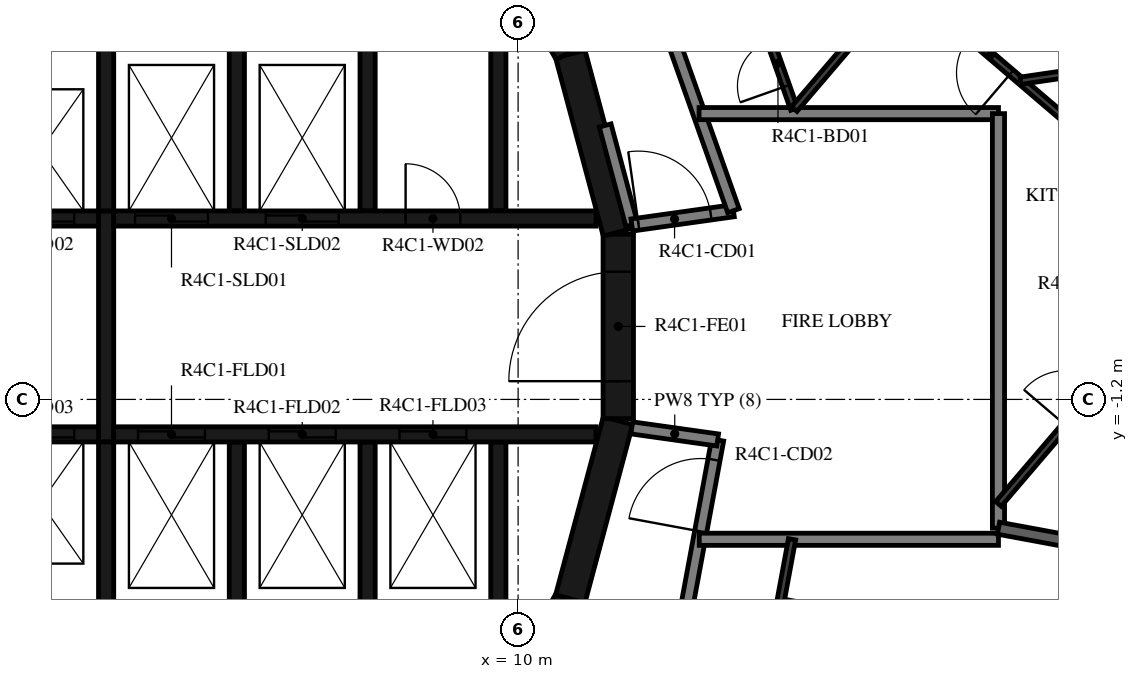
"""IFC4 building model, lengths in metres.
Left out: names, types, materials, properties, quantities, classifications, styles, units other than length and angle.
Written with IfcOpenShell. Run it as: python <this file> out.ifc"""

import sys

from ifc_helpers import new_model, si_unit, direction, frame, frame_2d, origin, place, context, subcontext, project, spatial, polyline, rectangle, outline, extrude, element, fill, save


model = new_model("IFC4")
c1 = context("Model", 3, precision=1e-05, world=origin(), true_north=direction((0.0, 1.0)))
c2 = subcontext(c1, "Body", "Model", "MODEL_VIEW")
j1 = project(units=[si_unit("LENGTHUNIT", "METRE"), si_unit("PLANEANGLEUNIT", "RADIAN")], contexts=[c1])
p1 = place(None, origin())
s1 = spatial("IfcSite", under=j1, at=p1, CompositionType="ELEMENT")
p2 = place(p1, origin())
s2 = spatial("IfcBuilding", under=s1, at=p2, CompositionType="ELEMENT")
p3 = place(p2, frame((0.0, 0.0, 176.2)))
s3 = spatial("IfcBuildingStorey", under=s2, at=p3, CompositionType="ELEMENT", Elevation=176.2)
for number, where, z_axis, x_axis in (
    (1, (9.329, -7.137, 0.0), (0.0, 0.0, 1.0), (0.5, 0.866, 0.0)),
    (2, (10.858, -4.479, 0.0), (0.0, 0.0, 1.0), (0.259, 0.966, 0.0)),
):
    element("IfcWall", number, at=place(p3, frame(where, z_axis=z_axis, x_axis=x_axis)), inside=s3, PredefinedType="SHEAR", context=c2, shape_type="SweptSolid", body=[
        extrude(rectangle(XDim=3.033, YDim=0.5, at=frame_2d((1.516, 0.0))), origin(), (0.0, 0.0, 1.0), 3.12),
    ])
p4 = place(p3, frame((11.647, -1.516, 0.0), z_axis=(0.0, 0.0, 1.0), x_axis=(0.0, 1.0, 0.0)))
e3 = element("IfcWall", 3, at=p4, inside=s3, PredefinedType="SHEAR", context=c2, shape_type="SweptSolid", body=[
    extrude(rectangle(XDim=3.033, YDim=0.5, at=frame_2d((1.516, 0.0))), origin(), (0.0, 0.0, 1.0), 3.12),
])
p5 = place(p4, frame((0.616, 0.0, 0.0)))
e4 = element("IfcOpeningElement", 4, at=p5, cuts=e3, PredefinedType="OPENING", context=c2, shape_type="SweptSolid", body=[
    extrude(rectangle(XDim=1.8, YDim=2.1, at=frame_2d((0.9, 1.05))), frame((0.0, 0.26, 0.0), z_axis=(0.0, -1.0, 0.0), x_axis=(1.0, 0.0, 0.0)), (0.0, 0.0, 1.0), 0.52),
])
for number, where, z_axis, x_axis in (
    (5, (11.643, 1.55, 0.0), (0.0, 0.0, 1.0), (-0.259, 0.966, 0.0)),
    (6, (10.845, 4.51, 0.0), (0.0, 0.0, 1.0), (-0.5, 0.866, 0.0)),
):
    element("IfcWall", number, at=place(p3, frame(where, z_axis=z_axis, x_axis=x_axis)), inside=s3, PredefinedType="SHEAR", context=c2, shape_type="SweptSolid", body=[
        extrude(rectangle(XDim=3.033, YDim=0.5, at=frame_2d((1.516, 0.0))), origin(), (0.0, 0.0, 1.0), 3.12),
    ])
p6 = place(p3, origin())
e7 = element("IfcWall", 7, at=p6, inside=s3, PredefinedType="SHEAR", context=c2, shape_type="SweptSolid", body=[
    extrude(outline(polyline([(-9.55, 4.8), (-1.2, 4.8), (-1.2, 1.9), (-0.95, 1.9), (-0.95, 4.8), (0.95, 4.8), (0.95, 1.9), (1.2, 1.9), (1.2, 4.8), (3.1, 4.8), (3.1, 1.9), (3.35, 1.9), (3.35, 4.8), (5.25, 4.8), (5.25, 1.9), (5.5, 1.9), (5.5, 4.8), (7.4, 4.8), (7.4, 1.9), (7.65, 1.9), (7.65, 4.8), (9.55, 4.8), (9.55, 1.9), (9.8, 1.9), (9.8, 4.8), (9.8, 5.05), (-9.8, 5.05), (-9.8, 4.8), (-9.8, 1.9), (-9.55, 1.9), (-9.55, 4.8)])), origin(), (0.0, 0.0, 1.0), 3.12),
])
p7 = place(p3, origin())
e8 = element("IfcWall", 8, at=p7, inside=s3, PredefinedType="SHEAR", context=c2, shape_type="SweptSolid", body=[
    extrude(outline(polyline([(9.8, -5.05), (9.8, -4.8), (9.8, -1.9), (9.55, -1.9), (9.55, -4.8), (7.65, -4.8), (7.65, -1.9), (7.4, -1.9), (7.4, -4.8), (5.5, -4.8), (5.5, -1.9), (5.25, -1.9), (5.25, -4.8), (3.35, -4.8), (3.35, -1.9), (3.1, -1.9), (3.1, -4.8), (1.2, -4.8), (1.2, -1.9), (0.95, -1.9), (0.95, -4.8), (-5.25, -4.8), (-5.25, -1.9), (-5.5, -1.9), (-5.5, -4.8), (-7.4, -4.8), (-7.4, -1.9), (-7.65, -1.9), (-7.65, -4.8), (-9.55, -4.8), (-9.55, -1.9), (-9.8, -1.9), (-9.8, -4.8), (-9.8, -5.05), (9.8, -5.05)])), origin(), (0.0, 0.0, 1.0), 3.12),
])
p8 = place(p3, frame((-11.28, 1.775, 0.0), z_axis=(0.0, 0.0, 1.0), x_axis=(1.0, 0.0, 0.0)))
e9 = element("IfcWall", 9, at=p8, inside=s3, PredefinedType="SHEAR", context=c2, shape_type="SweptSolid", body=[
    extrude(rectangle(XDim=14.38, YDim=0.25, at=frame_2d((7.19, 0.0))), origin(), (0.0, 0.0, 1.0), 3.12),
])
p9 = place(p8, frame((10.73, 0.0, 0.0)))
e10 = element("IfcOpeningElement", 10, at=p9, cuts=e9, PredefinedType="OPENING", context=c2, shape_type="SweptSolid", body=[
    extrude(rectangle(XDim=1.1, YDim=2.1, at=frame_2d((0.55, 1.05))), frame((0.0, 0.135, 0.0), z_axis=(0.0, -1.0, 0.0), x_axis=(1.0, 0.0, 0.0)), (0.0, 0.0, 1.0), 0.27),
])
p10 = place(p8, frame((12.88, 0.0, 0.0)))
e11 = element("IfcOpeningElement", 11, at=p10, cuts=e9, PredefinedType="OPENING", context=c2, shape_type="SweptSolid", body=[
    extrude(rectangle(XDim=1.1, YDim=2.1, at=frame_2d((0.55, 1.05))), frame((0.0, 0.135, 0.0), z_axis=(0.0, -1.0, 0.0), x_axis=(1.0, 0.0, 0.0)), (0.0, 0.0, 1.0), 0.27),
])
p11 = place(p8, frame((5.455, 0.0, 0.0)))
e12 = element("IfcOpeningElement", 12, at=p11, cuts=e9, PredefinedType="OPENING", context=c2, shape_type="SweptSolid", body=[
    extrude(rectangle(XDim=0.9, YDim=2.1, at=frame_2d((0.45, 1.05))), frame((0.0, 0.135, 0.0), z_axis=(0.0, -1.0, 0.0), x_axis=(1.0, 0.0, 0.0)), (0.0, 0.0, 1.0), 0.27),
])
p12 = place(p3, frame((3.35, 1.775, 0.0), z_axis=(0.0, 0.0, 1.0), x_axis=(1.0, 0.0, 0.0)))
e13 = element("IfcWall", 13, at=p12, inside=s3, PredefinedType="SHEAR", context=c2, shape_type="SweptSolid", body=[
    extrude(rectangle(XDim=7.93, YDim=0.25, at=frame_2d((3.965, 0.0))), origin(), (0.0, 0.0, 1.0), 3.12),
])
p13 = place(p12, frame((0.35, 0.0, 0.0)))
e14 = element("IfcOpeningElement", 14, at=p13, cuts=e13, PredefinedType="OPENING", context=c2, shape_type="SweptSolid", body=[
    extrude(rectangle(XDim=1.2, YDim=2.4, at=frame_2d((0.6, 1.2))), frame((0.0, 0.135, 0.0), z_axis=(0.0, -1.0, 0.0), x_axis=(1.0, 0.0, 0.0)), (0.0, 0.0, 1.0), 0.27),
])
p14 = place(p12, frame((2.5, 0.0, 0.0)))
e15 = element("IfcOpeningElement", 15, at=p14, cuts=e13, PredefinedType="OPENING", context=c2, shape_type="SweptSolid", body=[
    extrude(rectangle(XDim=1.2, YDim=2.4, at=frame_2d((0.6, 1.2))), frame((0.0, 0.135, 0.0), z_axis=(0.0, -1.0, 0.0), x_axis=(1.0, 0.0, 0.0)), (0.0, 0.0, 1.0), 0.27),
])
p15 = place(p12, frame((4.8, 0.0, 0.0)))
e16 = element("IfcOpeningElement", 16, at=p15, cuts=e13, PredefinedType="OPENING", context=c2, shape_type="SweptSolid", body=[
    extrude(rectangle(XDim=0.9, YDim=2.1, at=frame_2d((0.45, 1.05))), frame((0.0, 0.135, 0.0), z_axis=(0.0, -1.0, 0.0), x_axis=(1.0, 0.0, 0.0)), (0.0, 0.0, 1.0), 0.27),
])
p16 = place(p3, frame((-11.28, -1.775, 0.0), z_axis=(0.0, 0.0, 1.0), x_axis=(1.0, 0.0, 0.0)))
e17 = element("IfcWall", 17, at=p16, inside=s3, PredefinedType="SHEAR", context=c2, shape_type="SweptSolid", body=[
    extrude(rectangle(XDim=14.38, YDim=0.25, at=frame_2d((7.19, 0.0))), origin(), (0.0, 0.0, 1.0), 3.12),
])
p17 = place(p16, frame((12.88, 0.0, 0.0)))
e18 = element("IfcOpeningElement", 18, at=p17, cuts=e17, PredefinedType="OPENING", context=c2, shape_type="SweptSolid", body=[
    extrude(rectangle(XDim=1.1, YDim=2.1, at=frame_2d((0.55, 1.05))), frame((0.0, 0.135, 0.0), z_axis=(0.0, -1.0, 0.0), x_axis=(1.0, 0.0, 0.0)), (0.0, 0.0, 1.0), 0.27),
])
p18 = place(p16, frame((8.68, 0.0, 0.0)))
e19 = element("IfcOpeningElement", 19, at=p18, cuts=e17, PredefinedType="OPENING", context=c2, shape_type="SweptSolid", body=[
    extrude(rectangle(XDim=0.9, YDim=2.1, at=frame_2d((0.45, 1.05))), frame((0.0, 0.135, 0.0), z_axis=(0.0, -1.0, 0.0), x_axis=(1.0, 0.0, 0.0)), (0.0, 0.0, 1.0), 0.27),
])
p19 = place(p3, frame((3.35, -1.775, 0.0), z_axis=(0.0, 0.0, 1.0), x_axis=(1.0, 0.0, 0.0)))
e20 = element("IfcWall", 20, at=p19, inside=s3, PredefinedType="SHEAR", context=c2, shape_type="SweptSolid", body=[
    extrude(rectangle(XDim=7.93, YDim=0.25, at=frame_2d((3.965, 0.0))), origin(), (0.0, 0.0, 1.0), 3.12),
])
p20 = place(p19, frame((0.4, 0.0, 0.0)))
e21 = element("IfcOpeningElement", 21, at=p20, cuts=e20, PredefinedType="OPENING", context=c2, shape_type="SweptSolid", body=[
    extrude(rectangle(XDim=1.1, YDim=2.4, at=frame_2d((0.55, 1.2))), frame((0.0, 0.135, 0.0), z_axis=(0.0, -1.0, 0.0), x_axis=(1.0, 0.0, 0.0)), (0.0, 0.0, 1.0), 0.27),
])
p21 = place(p19, frame((2.55, 0.0, 0.0)))
e22 = element("IfcOpeningElement", 22, at=p21, cuts=e20, PredefinedType="OPENING", context=c2, shape_type="SweptSolid", body=[
    extrude(rectangle(XDim=1.1, YDim=2.4, at=frame_2d((0.55, 1.2))), frame((0.0, 0.135, 0.0), z_axis=(0.0, -1.0, 0.0), x_axis=(1.0, 0.0, 0.0)), (0.0, 0.0, 1.0), 0.27),
])
p22 = place(p19, frame((4.7, 0.0, 0.0)))
e23 = element("IfcOpeningElement", 23, at=p22, cuts=e20, PredefinedType="OPENING", context=c2, shape_type="SweptSolid", body=[
    extrude(rectangle(XDim=1.1, YDim=2.4, at=frame_2d((0.55, 1.2))), frame((0.0, 0.135, 0.0), z_axis=(0.0, -1.0, 0.0), x_axis=(1.0, 0.0, 0.0)), (0.0, 0.0, 1.0), 0.27),
])
p23 = place(p3, frame((3.225, -1.9, 0.0), z_axis=(0.0, 0.0, 1.0), x_axis=(0.0, 1.0, 0.0)))
e24 = element("IfcWall", 24, at=p23, inside=s3, PredefinedType="SHEAR", context=c2, shape_type="SweptSolid", body=[
    extrude(rectangle(XDim=3.8, YDim=0.25, at=frame_2d((1.9, 0.0))), origin(), (0.0, 0.0, 1.0), 3.12),
])
p24 = place(p3, frame((11.87, 1.668, 0.0), z_axis=(0.0, 0.0, 1.0), x_axis=(-0.258836880648, 0.965921047093, 0.0)))
e25 = element("IfcWall", 25, at=p24, inside=s3, PredefinedType="STANDARD", context=c2, shape_type="SweptSolid", body=[
    extrude(rectangle(XDim=1.695, YDim=0.2, at=frame_2d((0.848, 0.0))), origin(), (0.0, 0.0, 1.0), 3.12),
])
p25 = place(p3, frame((11.87, 1.668, 0.0), z_axis=(0.0, 0.0, 1.0), x_axis=(0.990270910415, 0.139152879904, 0.0)))
e26 = element("IfcWall", 26, at=p25, inside=s3, PredefinedType="STANDARD", context=c2, shape_type="SweptSolid", body=[
    extrude(rectangle(XDim=1.688, YDim=0.2, at=frame_2d((0.844, 0.0))), origin(), (0.0, 0.0, 1.0), 3.12),
])
p26 = place(p25, frame((0.11, 0.0, 0.0)))
e27 = element("IfcOpeningElement", 27, at=p26, cuts=e26, PredefinedType="OPENING", context=c2, shape_type="SweptSolid", body=[
    extrude(rectangle(XDim=1.2, YDim=2.1, at=frame_2d((0.6, 1.05))), frame((0.0, 0.11, 0.0), z_axis=(0.0, -1.0, 0.0), x_axis=(1.0, 0.0, 0.0)), (0.0, 0.0, 1.0), 0.22),
])
p27 = place(p3, frame((13.542, 1.903, 0.0), z_axis=(0.0, 0.0, 1.0), x_axis=(-0.333808508206, 0.942640907159, 0.0)))
e28 = element("IfcWall", 28, at=p27, inside=s3, PredefinedType="STANDARD", context=c2, shape_type="SweptSolid", body=[
    extrude(rectangle(XDim=6.317, YDim=0.2, at=frame_2d((3.158, 0.0))), origin(), (0.0, 0.0, 1.0), 3.12),
])
p28 = place(p3, frame((12.521, -5.972, 0.0), z_axis=(0.0, 0.0, 1.0), x_axis=(0.182244189886, 0.983253301674, 0.0)))
e29 = element("IfcWall", 29, at=p28, inside=s3, PredefinedType="STANDARD", context=c2, shape_type="SweptSolid", body=[
    extrude(rectangle(XDim=4.176, YDim=0.2, at=frame_2d((2.088, 0.0))), origin(), (0.0, 0.0, 1.0), 3.12),
])
p29 = place(p28, frame((2.645, 0.0, 0.0)))
e30 = element("IfcOpeningElement", 30, at=p29, cuts=e29, PredefinedType="OPENING", context=c2, shape_type="SweptSolid", body=[
    extrude(rectangle(XDim=1.2, YDim=2.1, at=frame_2d((0.6, 1.05))), frame((0.0, 0.11, 0.0), z_axis=(0.0, -1.0, 0.0), x_axis=(1.0, 0.0, 0.0)), (0.0, 0.0, 1.0), 0.22),
])
p30 = place(p3, frame((13.282, -1.867, 0.0), z_axis=(0.0, 0.0, 1.0), x_axis=(-0.990265430288, 0.139191873241, 0.0)))
e31 = element("IfcWall", 31, at=p30, inside=s3, PredefinedType="STANDARD", context=c2, shape_type="SweptSolid", body=[
    extrude(rectangle(XDim=1.426, YDim=0.2, at=frame_2d((0.713, 0.0))), origin(), (0.0, 0.0, 1.0), 3.12),
])
p31 = place(p3, frame((17.9, 3.5, 0.0), z_axis=(0.0, 0.0, 1.0), x_axis=(-1.0, 0.0, 0.0)))
e32 = element("IfcWall", 32, at=p31, inside=s3, PredefinedType="STANDARD", context=c2, shape_type="SweptSolid", body=[
    extrude(rectangle(XDim=4.924, YDim=0.2, at=frame_2d((2.462, 0.0))), origin(), (0.0, 0.0, 1.0), 3.12),
])
p32 = place(p3, frame((17.9, -3.318, 0.0), z_axis=(0.0, 0.0, 1.0), x_axis=(0.0, 1.0, 0.0)))
e33 = element("IfcWall", 33, at=p32, inside=s3, PredefinedType="STANDARD", context=c2, shape_type="SweptSolid", body=[
    extrude(rectangle(XDim=6.818, YDim=0.2, at=frame_2d((3.409, 0.0))), origin(), (0.0, 0.0, 1.0), 3.12),
])
p33 = place(p3, frame((12.979, -3.5, 0.0), z_axis=(0.0, 0.0, 1.0), x_axis=(1.0, 0.0, 0.0)))
e34 = element("IfcWall", 34, at=p33, inside=s3, PredefinedType="STANDARD", context=c2, shape_type="SweptSolid", body=[
    extrude(rectangle(XDim=4.92, YDim=0.2, at=frame_2d((2.46, 0.0))), origin(), (0.0, 0.0, 1.0), 3.12),
])
p34 = place(p3, frame((17.9, -3.318, 0.0), z_axis=(0.0, 0.0, 1.0), x_axis=(0.983252800712, -0.182246892682, 0.0)))
e35 = element("IfcWall", 35, at=p34, inside=s3, PredefinedType="STANDARD", context=c2, shape_type="SweptSolid", body=[
    extrude(rectangle(XDim=1.386, YDim=0.2, at=frame_2d((0.693, 0.0))), origin(), (0.0, 0.0, 1.0), 3.12),
])
p35 = place(p3, frame((14.541, 3.575, 0.0), z_axis=(0.0, 0.0, 1.0), x_axis=(-0.333799280318, 0.942644174893, 0.0)))
e36 = element("IfcWall", 36, at=p35, inside=s3, PredefinedType="PARTITIONING", context=c2, shape_type="SweptSolid", body=[
    extrude(rectangle(XDim=5.477, YDim=0.12, at=frame_2d((2.738, 0.0))), origin(), (0.0, 0.0, 1.0), 3.12),
])
p36 = place(p35, frame((0.4, 0.0, 0.0)))
e37 = element("IfcOpeningElement", 37, at=p36, cuts=e36, PredefinedType="OPENING", context=c2, shape_type="SweptSolid", body=[
    extrude(rectangle(XDim=0.8, YDim=2.1, at=frame_2d((0.4, 1.05))), frame((0.0, 0.07, 0.0), z_axis=(0.0, -1.0, 0.0), x_axis=(1.0, 0.0, 0.0)), (0.0, 0.0, 1.0), 0.14),
])
p37 = place(p3, frame((23.411, -0.357, 0.0), z_axis=(0.0, 0.0, 1.0), x_axis=(-0.76041871148, 0.649433124525, 0.0)))
e38 = element("IfcWall", 38, at=p37, inside=s3, PredefinedType="PARTITIONING", context=c2, shape_type="SweptSolid", body=[
    extrude(rectangle(XDim=9.259, YDim=0.12, at=frame_2d((4.629, 0.0))), origin(), (0.0, 0.0, 1.0), 3.12),
])
p38 = place(p37, frame((6.972, 0.0, 0.0)))
e39 = element("IfcOpeningElement", 39, at=p38, cuts=e38, PredefinedType="OPENING", context=c2, shape_type="SweptSolid", body=[
    extrude(rectangle(XDim=0.9, YDim=2.1, at=frame_2d((0.45, 1.05))), frame((0.0, 0.07, 0.0), z_axis=(0.0, -1.0, 0.0), x_axis=(1.0, 0.0, 0.0)), (0.0, 0.0, 1.0), 0.14),
])
p39 = place(p37, frame((0.2, 0.0, 0.0)))
e40 = element("IfcOpeningElement", 40, at=p39, cuts=e38, PredefinedType="OPENING", context=c2, shape_type="SweptSolid", body=[
    extrude(rectangle(XDim=0.9, YDim=2.1, at=frame_2d((0.45, 1.05))), frame((0.0, 0.07, 0.0), z_axis=(0.0, -1.0, 0.0), x_axis=(1.0, 0.0, 0.0)), (0.0, 0.0, 1.0), 0.14),
])
p40 = place(p3, frame((16.341, 5.682, 0.0), z_axis=(0.0, 0.0, 1.0), x_axis=(-0.64946993237, -0.76038727432, 0.0)))
e41 = element("IfcWall", 41, at=p40, inside=s3, PredefinedType="PARTITIONING", context=c2, shape_type="SweptSolid", body=[
    extrude(rectangle(XDim=2.771, YDim=0.12, at=frame_2d((1.386, 0.0))), origin(), (0.0, 0.0, 1.0), 3.12),
])
p41 = place(p3, frame((17.9, -2.918, 0.0), z_axis=(0.0, 0.0, 1.0), x_axis=(0.649469887983, 0.760387312232, 0.0)))
e42 = element("IfcWall", 42, at=p41, inside=s3, PredefinedType="PARTITIONING", context=c2, shape_type="SweptSolid", body=[
    extrude(rectangle(XDim=5.527, YDim=0.12, at=frame_2d((2.763, 0.0))), origin(), (0.0, 0.0, 1.0), 3.12),
])
p42 = place(p41, frame((1.7, 0.0, 0.0)))
e43 = element("IfcOpeningElement", 43, at=p42, cuts=e42, PredefinedType="OPENING", context=c2, shape_type="SweptSolid", body=[
    extrude(rectangle(XDim=0.9, YDim=2.1, at=frame_2d((0.45, 1.05))), frame((0.0, 0.07, 0.0), z_axis=(0.0, -1.0, 0.0), x_axis=(1.0, 0.0, 0.0)), (0.0, 0.0, 1.0), 0.14),
])
p43 = place(p3, frame((22.994, 4.734, 0.0), z_axis=(0.0, 0.0, 1.0), x_axis=(-0.989449286977, -0.144879634529, 0.0)))
e44 = element("IfcWall", 44, at=p43, inside=s3, PredefinedType="PARTITIONING", context=c2, shape_type="SweptSolid", body=[
    extrude(rectangle(XDim=4.782, YDim=0.12, at=frame_2d((2.391, 0.0))), origin(), (0.0, 0.0, 1.0), 3.12),
])
p44 = place(p43, frame((0.7, 0.0, 0.0)))
e45 = element("IfcOpeningElement", 45, at=p44, cuts=e44, PredefinedType="OPENING", context=c2, shape_type="SweptSolid", body=[
    extrude(rectangle(XDim=0.9, YDim=2.1, at=frame_2d((0.45, 1.05))), frame((0.0, 0.07, 0.0), z_axis=(0.0, -1.0, 0.0), x_axis=(1.0, 0.0, 0.0)), (0.0, 0.0, 1.0), 0.14),
])
p45 = place(p3, frame((18.507, -5.312, 0.0), z_axis=(0.0, 0.0, 1.0), x_axis=(-0.983254286603, 0.182238875868, 0.0)))
e46 = element("IfcWall", 46, at=p45, inside=s3, PredefinedType="PARTITIONING", context=c2, shape_type="SweptSolid", body=[
    extrude(rectangle(XDim=4.266, YDim=0.12, at=frame_2d((2.133, 0.0))), origin(), (0.0, 0.0, 1.0), 3.12),
])
p46 = place(p3, frame((14.313, -4.535, 0.0), z_axis=(0.0, 0.0, 1.0), x_axis=(0.182271946033, 0.983248156718, 0.0)))
e47 = element("IfcWall", 47, at=p46, inside=s3, PredefinedType="PARTITIONING", context=c2, shape_type="SweptSolid", body=[
    extrude(rectangle(XDim=1.053, YDim=0.12, at=frame_2d((0.526, 0.0))), origin(), (0.0, 0.0, 1.0), 3.12),
])
p47 = place(p5, origin())
e48 = element("IfcDoor", 48, at=p47, inside=s3, OperationType="DOUBLE_DOOR_SINGLE_SWING", PredefinedType="DOOR", context=c2, shape_type="SweptSolid", body=[
    extrude(rectangle(XDim=1.8, YDim=2.1, at=frame_2d((0.9, 1.05))), frame((0.0, 0.025, 0.0), z_axis=(0.0, -1.0, 0.0), x_axis=(1.0, 0.0, 0.0)), (0.0, 0.0, 1.0), 0.05),
])
fill(e4, e48)
p48 = place(p10, origin())
e49 = element("IfcDoor", 49, at=p48, inside=s3, OperationType="DOUBLE_DOOR_SLIDING", PredefinedType="DOOR", context=c2, shape_type="SweptSolid", body=[
    extrude(rectangle(XDim=1.1, YDim=2.1, at=frame_2d((0.55, 1.05))), frame((0.0, 0.025, 0.0), z_axis=(0.0, -1.0, 0.0), x_axis=(1.0, 0.0, 0.0)), (0.0, 0.0, 1.0), 0.05),
])
fill(e11, e49)
p49 = place(p13, origin())
e50 = element("IfcDoor", 50, at=p49, inside=s3, OperationType="DOUBLE_DOOR_SLIDING", PredefinedType="DOOR", context=c2, shape_type="SweptSolid", body=[
    extrude(rectangle(XDim=1.2, YDim=2.4, at=frame_2d((0.6, 1.2))), frame((0.0, 0.025, 0.0), z_axis=(0.0, -1.0, 0.0), x_axis=(1.0, 0.0, 0.0)), (0.0, 0.0, 1.0), 0.05),
])
fill(e14, e50)
p50 = place(p14, origin())
e51 = element("IfcDoor", 51, at=p50, inside=s3, OperationType="DOUBLE_DOOR_SLIDING", PredefinedType="DOOR", context=c2, shape_type="SweptSolid", body=[
    extrude(rectangle(XDim=1.2, YDim=2.4, at=frame_2d((0.6, 1.2))), frame((0.0, 0.025, 0.0), z_axis=(0.0, -1.0, 0.0), x_axis=(1.0, 0.0, 0.0)), (0.0, 0.0, 1.0), 0.05),
])
fill(e15, e51)
p51 = place(p17, origin())
e52 = element("IfcDoor", 52, at=p51, inside=s3, OperationType="DOUBLE_DOOR_SLIDING", PredefinedType="DOOR", context=c2, shape_type="SweptSolid", body=[
    extrude(rectangle(XDim=1.1, YDim=2.1, at=frame_2d((0.55, 1.05))), frame((0.0, 0.025, 0.0), z_axis=(0.0, -1.0, 0.0), x_axis=(1.0, 0.0, 0.0)), (0.0, 0.0, 1.0), 0.05),
])
fill(e18, e52)
p52 = place(p20, origin())
e53 = element("IfcDoor", 53, at=p52, inside=s3, OperationType="DOUBLE_DOOR_SLIDING", PredefinedType="DOOR", context=c2, shape_type="SweptSolid", body=[
    extrude(rectangle(XDim=1.1, YDim=2.4, at=frame_2d((0.55, 1.2))), frame((0.0, 0.025, 0.0), z_axis=(0.0, -1.0, 0.0), x_axis=(1.0, 0.0, 0.0)), (0.0, 0.0, 1.0), 0.05),
])
fill(e21, e53)
p53 = place(p21, origin())
e54 = element("IfcDoor", 54, at=p53, inside=s3, OperationType="DOUBLE_DOOR_SLIDING", PredefinedType="DOOR", context=c2, shape_type="SweptSolid", body=[
    extrude(rectangle(XDim=1.1, YDim=2.4, at=frame_2d((0.55, 1.2))), frame((0.0, 0.025, 0.0), z_axis=(0.0, -1.0, 0.0), x_axis=(1.0, 0.0, 0.0)), (0.0, 0.0, 1.0), 0.05),
])
fill(e22, e54)
p54 = place(p22, origin())
e55 = element("IfcDoor", 55, at=p54, inside=s3, OperationType="DOUBLE_DOOR_SLIDING", PredefinedType="DOOR", context=c2, shape_type="SweptSolid", body=[
    extrude(rectangle(XDim=1.1, YDim=2.4, at=frame_2d((0.55, 1.2))), frame((0.0, 0.025, 0.0), z_axis=(0.0, -1.0, 0.0), x_axis=(1.0, 0.0, 0.0)), (0.0, 0.0, 1.0), 0.05),
])
fill(e23, e55)
p55 = place(p15, origin())
e56 = element("IfcDoor", 56, at=p55, inside=s3, OperationType="SINGLE_SWING_RIGHT", PredefinedType="DOOR", context=c2, shape_type="SweptSolid", body=[
    extrude(rectangle(XDim=0.9, YDim=2.1, at=frame_2d((0.45, 1.05))), frame((0.0, 0.025, 0.0), z_axis=(0.0, -1.0, 0.0), x_axis=(1.0, 0.0, 0.0)), (0.0, 0.0, 1.0), 0.05),
])
fill(e16, e56)
p56 = place(p36, origin())
e57 = element("IfcDoor", 57, at=p56, inside=s3, OperationType="SINGLE_SWING_LEFT", PredefinedType="DOOR", context=c2, shape_type="SweptSolid", body=[
    extrude(rectangle(XDim=0.8, YDim=2.1, at=frame_2d((0.4, 1.05))), frame((0.0, 0.025, 0.0), z_axis=(0.0, -1.0, 0.0), x_axis=(1.0, 0.0, 0.0)), (0.0, 0.0, 1.0), 0.05),
])
fill(e37, e57)
p57 = place(p38, origin())
e58 = element("IfcDoor", 58, at=p57, inside=s3, OperationType="SINGLE_SWING_RIGHT", PredefinedType="DOOR", context=c2, shape_type="SweptSolid", body=[
    extrude(rectangle(XDim=0.9, YDim=2.1, at=frame_2d((0.45, 1.05))), frame((0.0, 0.025, 0.0), z_axis=(0.0, -1.0, 0.0), x_axis=(1.0, 0.0, 0.0)), (0.0, 0.0, 1.0), 0.05),
])
fill(e39, e58)
p58 = place(p26, origin())
e59 = element("IfcDoor", 59, at=p58, inside=s3, OperationType="DOUBLE_DOOR_SINGLE_SWING", PredefinedType="DOOR", context=c2, shape_type="SweptSolid", body=[
    extrude(rectangle(XDim=1.2, YDim=2.1, at=frame_2d((0.6, 1.05))), frame((0.0, 0.025, 0.0), z_axis=(0.0, -1.0, 0.0), x_axis=(1.0, 0.0, 0.0)), (0.0, 0.0, 1.0), 0.05),
])
fill(e27, e59)
p59 = place(p29, origin())
e60 = element("IfcDoor", 60, at=p59, inside=s3, OperationType="DOUBLE_DOOR_SINGLE_SWING", PredefinedType="DOOR", context=c2, shape_type="SweptSolid", body=[
    extrude(rectangle(XDim=1.2, YDim=2.1, at=frame_2d((0.6, 1.05))), frame((0.0, 0.025, 0.0), z_axis=(0.0, -1.0, 0.0), x_axis=(1.0, 0.0, 0.0)), (0.0, 0.0, 1.0), 0.05),
])
fill(e30, e60)
save(model, sys.argv[1])
